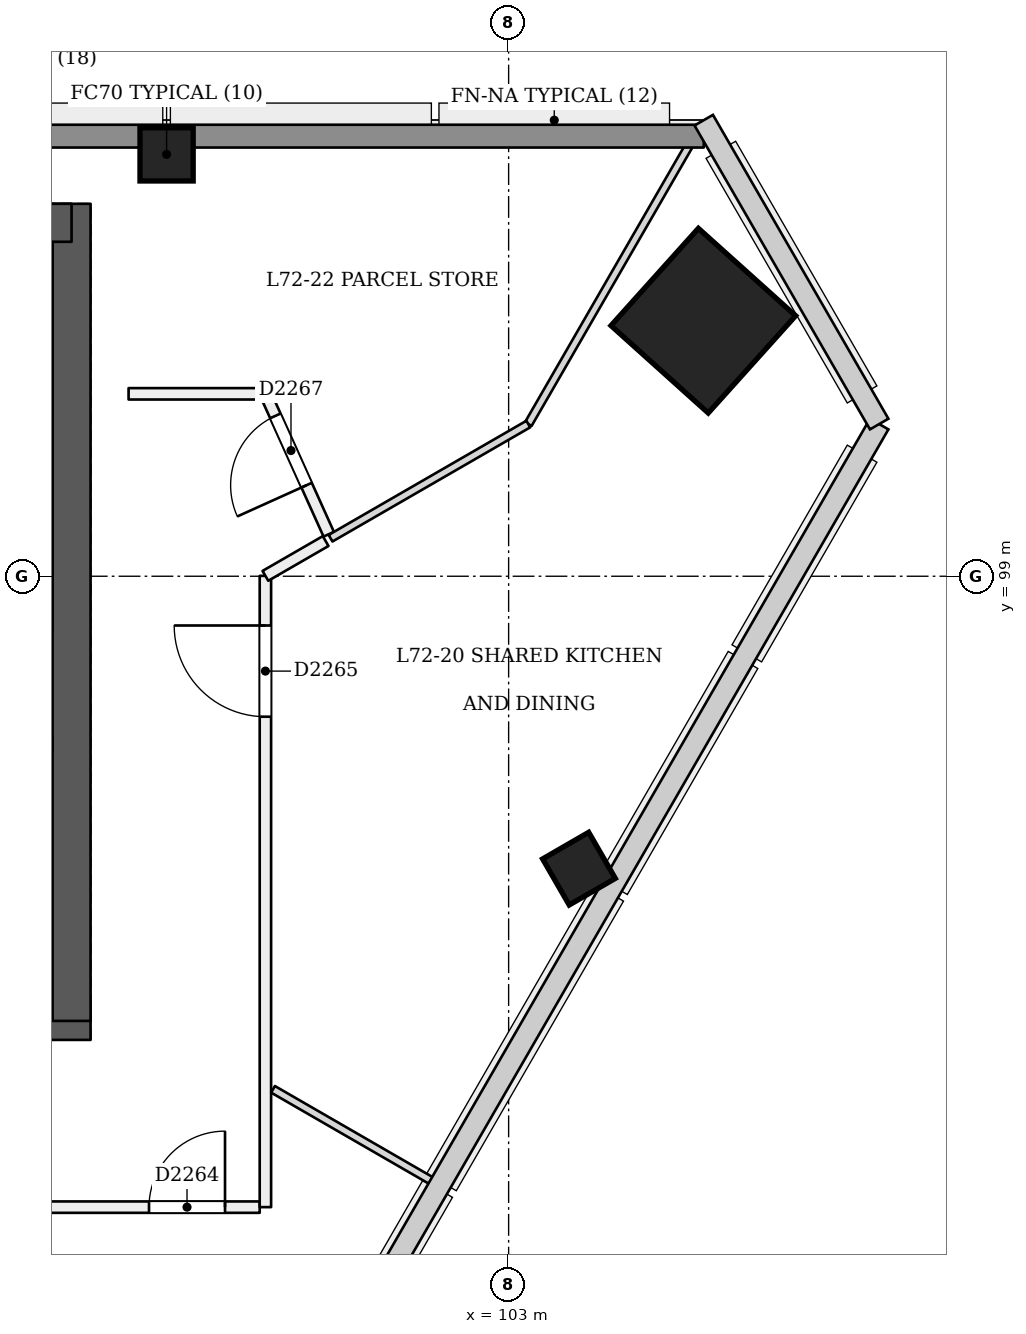
"""IFC4 building model, lengths in metres.
Left out: names, types, materials, properties, quantities, classifications, styles, units other than length and angle.
Written with IfcOpenShell. Run it as: python <this file> out.ifc"""

import sys

from ifc_helpers import new_model, si_unit, direction, frame, frame_2d, origin, origin_2d, place, context, subcontext, project, spatial, rectangle, extrude, element, fill, save


model = new_model("IFC4")
c1 = context("Model", 3, precision=1e-05, world=origin(), true_north=direction((0.0, 1.0)))
c2 = subcontext(c1, "Body", "Model", "MODEL_VIEW")
j1 = project(units=[si_unit("LENGTHUNIT", "METRE"), si_unit("PLANEANGLEUNIT", "RADIAN")], contexts=[c1])
p1 = place(None, origin())
s1 = spatial("IfcSite", under=j1, at=p1, CompositionType="ELEMENT")
p2 = place(p1, origin())
s2 = spatial("IfcBuilding", under=s1, at=p2, CompositionType="ELEMENT")
p3 = place(p2, frame((0.0, 0.0, 278.8)))
s3 = spatial("IfcBuildingStorey", under=s2, at=p3, CompositionType="ELEMENT", Elevation=278.8)
p4 = place(p3, frame((72.75, 93.15, 0.0), z_axis=(0.0, 0.0, 1.0), x_axis=(1.0, 0.0, 0.0)))
e1 = element("IfcWall", 1, at=p4, inside=s3, PredefinedType="SHEAR", context=c2, shape_type="SweptSolid", body=[
    extrude(rectangle(XDim=24.75, YDim=0.5, at=frame_2d((12.375, 0.0))), origin(), (0.0, 0.0, 1.0), 3.6),
])
p5 = place(p4, frame((1.05, 0.0, 0.0)))
e2 = element("IfcOpeningElement", 2, at=p5, cuts=e1, PredefinedType="OPENING", context=c2, shape_type="SweptSolid", body=[
    extrude(rectangle(XDim=1.2, YDim=2.1, at=frame_2d((0.6, 1.05))), frame((0.0, 0.26, 0.0), z_axis=(0.0, -1.0, 0.0), x_axis=(1.0, 0.0, 0.0)), (0.0, 0.0, 1.0), 0.521),
])
p6 = place(p4, frame((3.25, 0.0, 0.0)))
e3 = element("IfcOpeningElement", 3, at=p6, cuts=e1, PredefinedType="OPENING", context=c2, shape_type="SweptSolid", body=[
    extrude(rectangle(XDim=1.2, YDim=2.1, at=frame_2d((0.6, 1.05))), frame((0.0, 0.26, 0.0), z_axis=(0.0, -1.0, 0.0), x_axis=(1.0, 0.0, 0.0)), (0.0, 0.0, 1.0), 0.521),
])
p7 = place(p4, frame((13.25, 0.0, 0.0)))
e4 = element("IfcOpeningElement", 4, at=p7, cuts=e1, PredefinedType="OPENING", context=c2, shape_type="SweptSolid", body=[
    extrude(rectangle(XDim=1.2, YDim=2.1, at=frame_2d((0.6, 1.05))), frame((0.0, 0.26, 0.0), z_axis=(0.0, -1.0, 0.0), x_axis=(1.0, 0.0, 0.0)), (0.0, 0.0, 1.0), 0.521),
])
p8 = place(p4, frame((15.562, 0.0, 0.0)))
e5 = element("IfcOpeningElement", 5, at=p8, cuts=e1, PredefinedType="OPENING", context=c2, shape_type="SweptSolid", body=[
    extrude(rectangle(XDim=1.0, YDim=2.1, at=frame_2d((0.5, 1.05))), frame((0.0, 0.26, 0.0), z_axis=(0.0, -1.0, 0.0), x_axis=(1.0, 0.0, 0.0)), (0.0, 0.0, 1.0), 0.521),
])
p9 = place(p4, frame((19.0, 0.0, 0.0)))
e6 = element("IfcOpeningElement", 6, at=p9, cuts=e1, PredefinedType="OPENING", context=c2, shape_type="SweptSolid", body=[
    extrude(rectangle(XDim=1.0, YDim=2.1, at=frame_2d((0.5, 1.05))), frame((0.0, 0.26, 0.0), z_axis=(0.0, -1.0, 0.0), x_axis=(1.0, 0.0, 0.0)), (0.0, 0.0, 1.0), 0.521),
])
p10 = place(p4, frame((22.538, 0.0, 0.0)))
e7 = element("IfcOpeningElement", 7, at=p10, cuts=e1, PredefinedType="OPENING", context=c2, shape_type="SweptSolid", body=[
    extrude(rectangle(XDim=1.0, YDim=2.1, at=frame_2d((0.5, 1.05))), frame((0.0, 0.26, 0.0), z_axis=(0.0, -1.0, 0.0), x_axis=(1.0, 0.0, 0.0)), (0.0, 0.0, 1.0), 0.521),
])
p11 = place(p3, frame((97.25, 93.15, 0.0), z_axis=(0.0, 0.0, 1.0), x_axis=(0.0, 1.0, 0.0)))
e8 = element("IfcWall", 8, at=p11, inside=s3, PredefinedType="SHEAR", context=c2, shape_type="SweptSolid", body=[
    extrude(rectangle(XDim=10.75, YDim=0.5, at=frame_2d((5.375, 0.0))), origin(), (0.0, 0.0, 1.0), 3.6),
])
p12 = place(p3, frame((97.25, 103.65, 0.0), z_axis=(0.0, 0.0, 1.0), x_axis=(-1.0, 0.0, 0.0)))
e9 = element("IfcWall", 9, at=p12, inside=s3, PredefinedType="SHEAR", context=c2, shape_type="SweptSolid", body=[
    extrude(rectangle(XDim=24.75, YDim=0.5, at=frame_2d((12.375, 0.0))), origin(), (0.0, 0.0, 1.0), 3.6),
])
p13 = place(p3, frame((105.595, 102.351, 0.0), z_axis=(-0.028336004223, 0.009219369795, 0.999555938447), x_axis=(0.500145639136, -0.865657640444, 0.022162788488)))
e10 = element("IfcColumn", 10, at=p13, inside=s3, PredefinedType="COLUMN", context=c2, shape_type="SweptSolid", body=[
    extrude(rectangle(XDim=1.72, YDim=1.72, at=origin_2d()), origin(), (0.0, 0.0, 1.0), 3.602),
])
p14 = place(p3, frame((98.5, 104.55, 0.0), z_axis=(0.0, 0.0, 1.0), x_axis=(1.0, 0.0, 0.0)))
e11 = element("IfcColumn", 11, at=p14, inside=s3, PredefinedType="COLUMN", context=c2, shape_type="SweptSolid", body=[
    extrude(rectangle(XDim=0.7, YDim=0.7, at=origin_2d()), origin(), (0.0, 0.0, 1.0), 3.6),
])
p15 = place(p3, frame((103.952, 95.106, -0.021), z_axis=(-0.022155133694, 0.038483534979, 0.999013597298), x_axis=(-0.501312932815, -0.864981144328, 0.022202777955)))
e12 = element("IfcColumn", 12, at=p15, inside=s3, PredefinedType="COLUMN", context=c2, shape_type="SweptSolid", body=[
    extrude(rectangle(XDim=0.7, YDim=0.7, at=origin_2d()), origin(), (0.0, 0.0, 1.0), 3.604),
])
p16 = place(p3, frame((94.422, 90.7, 0.0), z_axis=(0.0, 0.0, 1.0), x_axis=(1.0, 0.0, 0.0)))
e13 = element("IfcWall", 13, at=p16, inside=s3, PredefinedType="PARTITIONING", context=c2, shape_type="SweptSolid", body=[
    extrude(rectangle(XDim=5.303, YDim=0.15, at=frame_2d((2.652, 0.0))), origin(), (0.0, 0.0, 1.0), 3.2),
])
p17 = place(p16, frame((3.847, 0.0, 0.0)))
e14 = element("IfcOpeningElement", 14, at=p17, cuts=e13, PredefinedType="OPENING", context=c2, shape_type="SweptSolid", body=[
    extrude(rectangle(XDim=1.0, YDim=2.1, at=frame_2d((0.5, 1.05))), frame((0.0, 0.085, 0.0), z_axis=(0.0, -1.0, 0.0), x_axis=(1.0, 0.0, 0.0)), (0.0, 0.0, 1.0), 0.171),
])
p18 = place(p3, frame((99.8, 90.7, 0.0), z_axis=(0.0, 0.0, 1.0), x_axis=(0.0, 1.0, 0.0)))
e15 = element("IfcWall", 15, at=p18, inside=s3, PredefinedType="PARTITIONING", context=c2, shape_type="SweptSolid", body=[
    extrude(rectangle(XDim=8.305, YDim=0.15, at=frame_2d((4.153, 0.0))), origin(), (0.0, 0.0, 1.0), 3.2),
])
p19 = place(p18, frame((6.452, 0.0, 0.0)))
e16 = element("IfcOpeningElement", 16, at=p19, cuts=e15, PredefinedType="OPENING", context=c2, shape_type="SweptSolid", body=[
    extrude(rectangle(XDim=1.2, YDim=2.1, at=frame_2d((0.6, 1.05))), frame((0.0, 0.085, 0.0), z_axis=(0.0, -1.0, 0.0), x_axis=(1.0, 0.0, 0.0)), (0.0, 0.0, 1.0), 0.171),
])
p20 = place(p3, frame((99.8, 99.005, 0.0), z_axis=(0.0, 0.0, 1.0), x_axis=(0.866034527326, 0.49998419723, 0.0)))
e17 = element("IfcWall", 17, at=p20, inside=s3, PredefinedType="PARTITIONING", context=c2, shape_type="SweptSolid", body=[
    extrude(rectangle(XDim=0.915, YDim=0.15, at=frame_2d((0.458, 0.0))), origin(), (0.0, 0.0, 1.0), 3.2),
])
p21 = place(p3, frame((100.633, 99.553, 0.0), z_axis=(0.0, 0.0, 1.0), x_axis=(-0.411196089884, 0.911546913584, 0.0)))
e18 = element("IfcWall", 18, at=p21, inside=s3, PredefinedType="PARTITIONING", context=c2, shape_type="SweptSolid", body=[
    extrude(rectangle(XDim=2.026, YDim=0.15, at=frame_2d((1.013, 0.0))), origin(), (0.0, 0.0, 1.0), 3.2),
])
p22 = place(p21, frame((0.708, 0.0, 0.0)))
e19 = element("IfcOpeningElement", 19, at=p22, cuts=e18, PredefinedType="OPENING", context=c2, shape_type="SweptSolid", body=[
    extrude(rectangle(XDim=1.0, YDim=2.1, at=frame_2d((0.5, 1.05))), frame((0.0, 0.085, 0.0), z_axis=(0.0, -1.0, 0.0), x_axis=(1.0, 0.0, 0.0)), (0.0, 0.0, 1.0), 0.171),
])
p23 = place(p3, frame((99.8, 101.4, 0.0), z_axis=(0.0, 0.0, 1.0), x_axis=(-1.0, 0.0, 0.0)))
e20 = element("IfcWall", 20, at=p23, inside=s3, PredefinedType="PARTITIONING", context=c2, shape_type="SweptSolid", body=[
    extrude(rectangle(XDim=1.8, YDim=0.15, at=frame_2d((0.9, 0.0))), origin(), (0.0, 0.0, 1.0), 3.2),
])
p24 = place(p3, frame((99.755, 87.138, 0.0), z_axis=(0.0, 0.0, 1.0), x_axis=(-0.866032601554, 0.49998753289, 0.0)))
e21 = element("IfcWall", 21, at=p24, inside=s3, PredefinedType="PARTITIONING", context=c2, shape_type="SweptSolid", body=[
    extrude(rectangle(XDim=6.325, YDim=0.1, at=frame_2d((3.163, 0.0))), origin(), (0.0, 0.0, 1.0), 2.7),
])
p25 = place(p3, frame((102.023, 91.025, 0.0), z_axis=(0.0, 0.0, 1.0), x_axis=(-0.866028016946, 0.499995473844, 0.0)))
e22 = element("IfcWall", 22, at=p25, inside=s3, PredefinedType="PARTITIONING", context=c2, shape_type="SweptSolid", body=[
    extrude(rectangle(XDim=2.451, YDim=0.1, at=frame_2d((1.226, 0.0))), origin(), (0.0, 0.0, 1.0), 2.7),
])
p26 = place(p3, frame((105.509, 104.9, 0.0), z_axis=(0.0, 0.0, 1.0), x_axis=(-0.500041721178, -0.866001314711, 0.0)))
e23 = element("IfcWall", 23, at=p26, inside=s3, PredefinedType="PARTITIONING", context=c2, shape_type="SweptSolid", body=[
    extrude(rectangle(XDim=4.501, YDim=0.1, at=frame_2d((2.25, 0.0))), origin(), (0.0, 0.0, 1.0), 2.7),
])
p27 = place(p3, frame((103.259, 101.002, 0.0), z_axis=(0.0, 0.0, 1.0), x_axis=(-0.866013688016, -0.500020291757, 0.0)))
e24 = element("IfcWall", 24, at=p27, inside=s3, PredefinedType="PARTITIONING", context=c2, shape_type="SweptSolid", body=[
    extrude(rectangle(XDim=3.004, YDim=0.1, at=frame_2d((1.502, 0.0))), origin(), (0.0, 0.0, 1.0), 3.2),
])
p28 = place(p3, frame((64.433, 104.79, 0.0), z_axis=(0.0, 0.0, 1.0), x_axis=(1.0, 0.0, 0.0)))
e25 = element("IfcWall", 25, at=p28, inside=s3, PredefinedType="SOLIDWALL", context=c2, shape_type="SweptSolid", body=[
    extrude(rectangle(XDim=41.134, YDim=0.3, at=frame_2d((20.567, 0.0))), origin(), (0.0, 0.0, 1.0), 2.7),
])
p29 = place(p17, origin())
e26 = element("IfcDoor", 26, at=p29, inside=s3, OperationType="SINGLE_SWING_RIGHT", PredefinedType="NOTDEFINED", context=c2, shape_type="SweptSolid", body=[
    extrude(rectangle(XDim=1.0, YDim=2.1, at=frame_2d((0.5, 1.05))), frame((0.0, 0.025, 0.0), z_axis=(0.0, -1.0, 0.0), x_axis=(1.0, 0.0, 0.0)), (0.0, 0.0, 1.0), 0.05),
])
fill(e14, e26)
p30 = place(p19, origin())
e27 = element("IfcDoor", 27, at=p30, inside=s3, OperationType="SINGLE_SWING_RIGHT", PredefinedType="NOTDEFINED", context=c2, shape_type="SweptSolid", body=[
    extrude(rectangle(XDim=1.2, YDim=2.1, at=frame_2d((0.6, 1.05))), frame((0.0, 0.025, 0.0), z_axis=(0.0, -1.0, 0.0), x_axis=(1.0, 0.0, 0.0)), (0.0, 0.0, 1.0), 0.05),
])
fill(e16, e27)
p31 = place(p22, origin())
e28 = element("IfcDoor", 28, at=p31, inside=s3, OperationType="SINGLE_SWING_LEFT", PredefinedType="NOTDEFINED", context=c2, shape_type="SweptSolid", body=[
    extrude(rectangle(XDim=1.0, YDim=2.1, at=frame_2d((0.5, 1.05))), frame((0.0, 0.025, 0.0), z_axis=(0.0, -1.0, 0.0), x_axis=(1.0, 0.0, 0.0)), (0.0, 0.0, 1.0), 0.05),
])
fill(e19, e28)
save(model, sys.argv[1])
